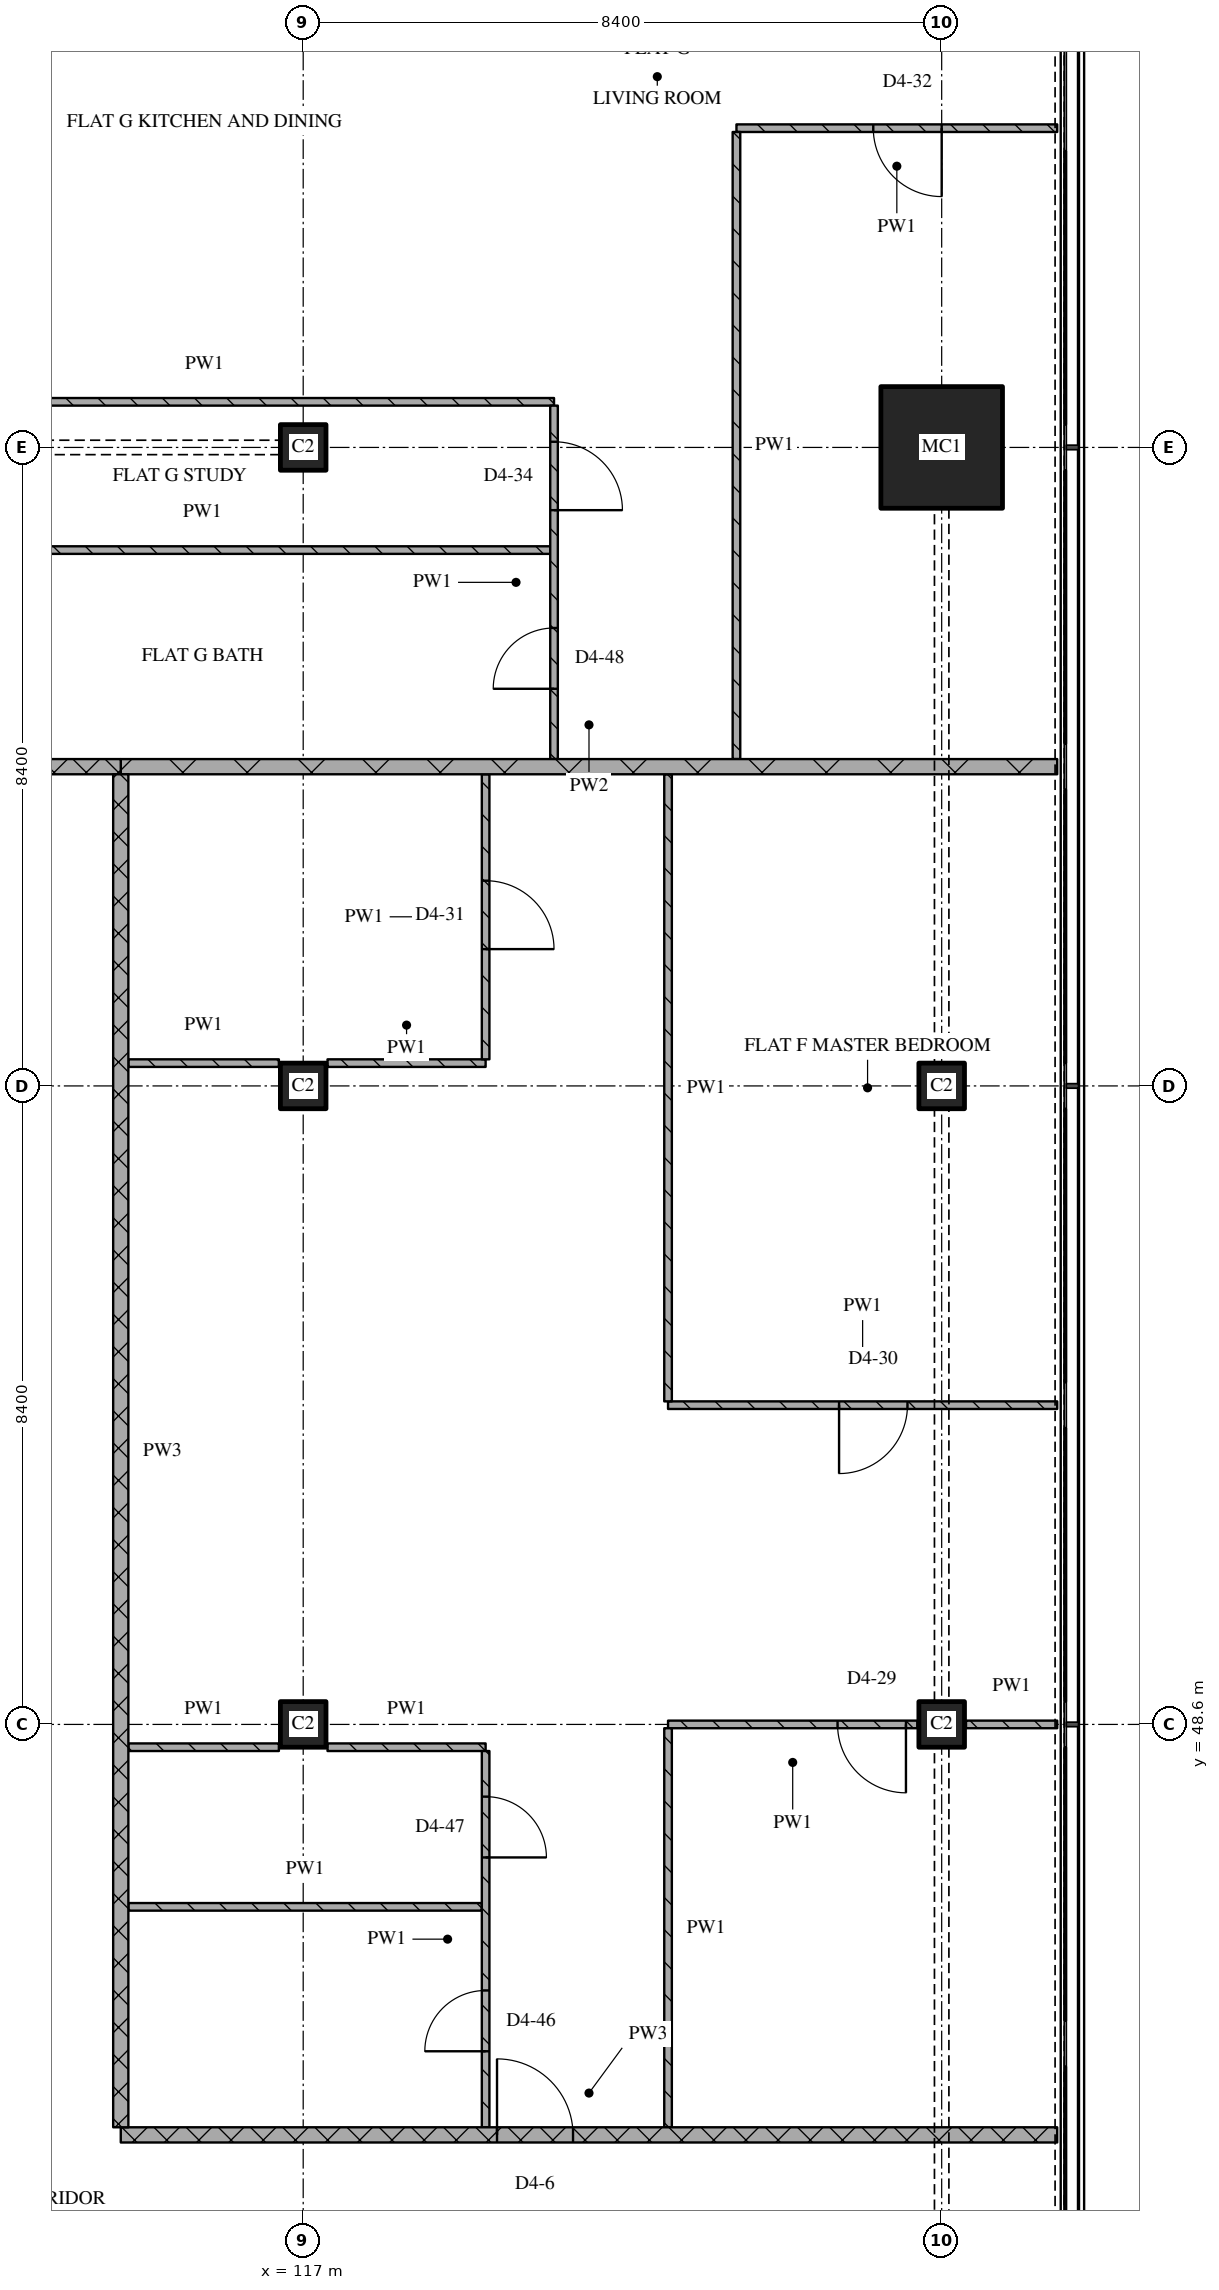
"""IFC4 building model, lengths in metres.
Left out: names, types, materials, properties, quantities, classifications, styles, units other than length and angle.
Written with IfcOpenShell. Run it as: python <this file> out.ifc"""

import sys

from ifc_helpers import new_model, si_unit, direction, frame, frame_2d, origin, origin_2d, place, context, subcontext, project, spatial, rectangle, extrude, element, fill, save


model = new_model("IFC4")
c1 = context("Model", 3, precision=1e-05, world=origin(), true_north=direction((0.0, 1.0)))
c2 = subcontext(c1, "Body", "Model", "MODEL_VIEW")
j1 = project(units=[si_unit("LENGTHUNIT", "METRE"), si_unit("PLANEANGLEUNIT", "RADIAN")], contexts=[c1])
p1 = place(None, origin())
s1 = spatial("IfcSite", under=j1, at=p1, CompositionType="ELEMENT")
p2 = place(p1, origin())
s2 = spatial("IfcBuilding", under=s1, at=p2, CompositionType="ELEMENT")
p3 = place(p2, frame((0.0, 0.0, 241.5)))
s3 = spatial("IfcBuildingStorey", under=s2, at=p3, CompositionType="ELEMENT", Elevation=241.5)
for number, where, z_axis, x_axis in (
    (1, (117.0, 48.6, 0.0), (0.0, 0.0, 1.0), (1.0, 0.0, 0.0)),
    (2, (117.0, 57.0, 0.0), (0.0, 0.0, 1.0), (1.0, 0.0, 0.0)),
    (3, (117.0, 65.4, 0.0), (0.0, 0.0, 1.0), (1.0, 0.0, 0.0)),
    (4, (125.4, 48.6, 0.0), (0.0, 0.0, 1.0), (1.0, 0.0, 0.0)),
    (5, (125.4, 57.0, 0.0), (0.0, 0.0, 1.0), (1.0, 0.0, 0.0)),
):
    element("IfcColumn", number, at=place(p3, frame(where, z_axis=z_axis, x_axis=x_axis)), inside=s3, PredefinedType="COLUMN", context=c2, shape_type="SweptSolid", body=[
        extrude(rectangle(XDim=0.6, YDim=0.6, at=origin_2d()), origin(), (0.0, 0.0, 1.0), 3.6),
    ])
p4 = place(p3, frame((125.4, 65.4, 0.0), z_axis=(0.0, 0.0, 1.0), x_axis=(1.0, 0.0, 0.0)))
e6 = element("IfcColumn", 6, at=p4, inside=s3, PredefinedType="COLUMN", context=c2, shape_type="SweptSolid", body=[
    extrude(rectangle(XDim=1.6, YDim=1.6, at=origin_2d()), origin(), (0.0, 0.0, 1.0), 3.6),
])
p5 = place(p3, frame((114.6, 43.2, 0.0), z_axis=(0.0, 0.0, 1.0), x_axis=(1.0, 0.0, 0.0)))
e7 = element("IfcWall", 7, at=p5, inside=s3, PredefinedType="PARTITIONING", context=c2, shape_type="SweptSolid", body=[
    extrude(rectangle(XDim=12.32, YDim=0.2, at=frame_2d((6.16, 0.0))), origin(), (0.0, 0.0, 1.0), 3.32),
])
p6 = place(p5, frame((4.95, 0.0, 0.0)))
e8 = element("IfcOpeningElement", 8, at=p6, cuts=e7, PredefinedType="OPENING", context=c2, shape_type="SweptSolid", body=[
    extrude(rectangle(XDim=1.0, YDim=2.1, at=frame_2d((0.5, 1.05))), frame((0.0, 0.11, 0.0), z_axis=(0.0, -1.0, 0.0), x_axis=(1.0, 0.0, 0.0)), (0.0, 0.0, 1.0), 0.22),
])
p7 = place(p3, frame((114.7, 46.2, 0.0), z_axis=(0.0, 0.0, 1.0), x_axis=(1.0, 0.0, 0.0)))
e9 = element("IfcWall", 9, at=p7, inside=s3, PredefinedType="PARTITIONING", context=c2, shape_type="SweptSolid", body=[
    extrude(rectangle(XDim=4.65, YDim=0.1, at=frame_2d((2.325, 0.0))), origin(), (0.0, 0.0, 1.0), 3.32),
])
p8 = place(p3, frame((114.7, 48.3, 0.0), z_axis=(0.0, 0.0, 1.0), x_axis=(1.0, 0.0, 0.0)))
e10 = element("IfcWall", 10, at=p8, inside=s3, PredefinedType="PARTITIONING", context=c2, shape_type="SweptSolid", body=[
    extrude(rectangle(XDim=1.98, YDim=0.1, at=frame_2d((0.99, 0.0))), origin(), (0.0, 0.0, 1.0), 3.32),
])
p9 = place(p3, frame((117.32, 48.3, 0.0), z_axis=(0.0, 0.0, 1.0), x_axis=(1.0, 0.0, 0.0)))
e11 = element("IfcWall", 11, at=p9, inside=s3, PredefinedType="PARTITIONING", context=c2, shape_type="SweptSolid", body=[
    extrude(rectangle(XDim=2.08, YDim=0.1, at=frame_2d((1.04, 0.0))), origin(), (0.0, 0.0, 1.0), 3.32),
])
p10 = place(p3, frame((125.08, 48.6, 0.0), z_axis=(0.0, 0.0, 1.0), x_axis=(-1.0, 0.0, 0.0)))
e12 = element("IfcWall", 12, at=p10, inside=s3, PredefinedType="PARTITIONING", context=c2, shape_type="SweptSolid", body=[
    extrude(rectangle(XDim=3.28, YDim=0.1, at=frame_2d((1.64, 0.0))), origin(), (0.0, 0.0, 1.0), 3.32),
])
p11 = place(p10, frame((0.15, 0.0, 0.0)))
e13 = element("IfcOpeningElement", 13, at=p11, cuts=e12, PredefinedType="OPENING", context=c2, shape_type="SweptSolid", body=[
    extrude(rectangle(XDim=0.9, YDim=2.1, at=frame_2d((0.45, 1.05))), frame((0.0, 0.06, 0.0), z_axis=(0.0, -1.0, 0.0), x_axis=(1.0, 0.0, 0.0)), (0.0, 0.0, 1.0), 0.12),
])
p12 = place(p3, frame((125.72, 48.6, 0.0), z_axis=(0.0, 0.0, 1.0), x_axis=(1.0, 0.0, 0.0)))
e14 = element("IfcWall", 14, at=p12, inside=s3, PredefinedType="PARTITIONING", context=c2, shape_type="SweptSolid", body=[
    extrude(rectangle(XDim=1.2, YDim=0.1, at=frame_2d((0.6, 0.0))), origin(), (0.0, 0.0, 1.0), 3.32),
])
p13 = place(p3, frame((121.8, 52.8, 0.0), z_axis=(0.0, 0.0, 1.0), x_axis=(1.0, 0.0, 0.0)))
e15 = element("IfcWall", 15, at=p13, inside=s3, PredefinedType="PARTITIONING", context=c2, shape_type="SweptSolid", body=[
    extrude(rectangle(XDim=5.12, YDim=0.1, at=frame_2d((2.56, 0.0))), origin(), (0.0, 0.0, 1.0), 3.32),
])
p14 = place(p13, frame((2.25, 0.0, 0.0)))
e16 = element("IfcOpeningElement", 16, at=p14, cuts=e15, PredefinedType="OPENING", context=c2, shape_type="SweptSolid", body=[
    extrude(rectangle(XDim=0.9, YDim=2.1, at=frame_2d((0.45, 1.05))), frame((0.0, 0.06, 0.0), z_axis=(0.0, -1.0, 0.0), x_axis=(1.0, 0.0, 0.0)), (0.0, 0.0, 1.0), 0.12),
])
p15 = place(p3, frame((114.7, 57.3, 0.0), z_axis=(0.0, 0.0, 1.0), x_axis=(1.0, 0.0, 0.0)))
e17 = element("IfcWall", 17, at=p15, inside=s3, PredefinedType="PARTITIONING", context=c2, shape_type="SweptSolid", body=[
    extrude(rectangle(XDim=1.98, YDim=0.1, at=frame_2d((0.99, 0.0))), origin(), (0.0, 0.0, 1.0), 3.32),
])
p16 = place(p3, frame((117.32, 57.3, 0.0), z_axis=(0.0, 0.0, 1.0), x_axis=(1.0, 0.0, 0.0)))
e18 = element("IfcWall", 18, at=p16, inside=s3, PredefinedType="PARTITIONING", context=c2, shape_type="SweptSolid", body=[
    extrude(rectangle(XDim=2.08, YDim=0.1, at=frame_2d((1.04, 0.0))), origin(), (0.0, 0.0, 1.0), 3.32),
])
p17 = place(p3, frame((111.0, 61.2, 0.0), z_axis=(0.0, 0.0, 1.0), x_axis=(1.0, 0.0, 0.0)))
e19 = element("IfcWall", 19, at=p17, inside=s3, PredefinedType="PARTITIONING", context=c2, shape_type="SweptSolid", body=[
    extrude(rectangle(XDim=3.6, YDim=0.2, at=frame_2d((1.8, 0.0))), origin(), (0.0, 0.0, 1.0), 3.32),
])
p18 = place(p3, frame((114.6, 61.2, 0.0), z_axis=(0.0, 0.0, 1.0), x_axis=(1.0, 0.0, 0.0)))
e20 = element("IfcWall", 20, at=p18, inside=s3, PredefinedType="PARTITIONING", context=c2, shape_type="SweptSolid", body=[
    extrude(rectangle(XDim=12.32, YDim=0.2, at=frame_2d((6.16, 0.0))), origin(), (0.0, 0.0, 1.0), 3.32),
])
p19 = place(p3, frame((111.1, 64.05, 0.0), z_axis=(0.0, 0.0, 1.0), x_axis=(1.0, 0.0, 0.0)))
e21 = element("IfcWall", 21, at=p19, inside=s3, PredefinedType="PARTITIONING", context=c2, shape_type="SweptSolid", body=[
    extrude(rectangle(XDim=9.15, YDim=0.1, at=frame_2d((4.575, 0.0))), origin(), (0.0, 0.0, 1.0), 3.32),
])
p20 = place(p3, frame((111.1, 66.0, 0.0), z_axis=(0.0, 0.0, 1.0), x_axis=(1.0, 0.0, 0.0)))
e22 = element("IfcWall", 22, at=p20, inside=s3, PredefinedType="PARTITIONING", context=c2, shape_type="SweptSolid", body=[
    extrude(rectangle(XDim=9.2, YDim=0.1, at=frame_2d((4.6, 0.0))), origin(), (0.0, 0.0, 1.0), 3.32),
])
p21 = place(p3, frame((126.92, 69.6, 0.0), z_axis=(0.0, 0.0, 1.0), x_axis=(-1.0, 0.0, 0.0)))
e23 = element("IfcWall", 23, at=p21, inside=s3, PredefinedType="PARTITIONING", context=c2, shape_type="SweptSolid", body=[
    extrude(rectangle(XDim=4.22, YDim=0.1, at=frame_2d((2.11, 0.0))), origin(), (0.0, 0.0, 1.0), 3.32),
])
p22 = place(p21, frame((1.52, 0.0, 0.0)))
e24 = element("IfcOpeningElement", 24, at=p22, cuts=e23, PredefinedType="OPENING", context=c2, shape_type="SweptSolid", body=[
    extrude(rectangle(XDim=0.9, YDim=2.1, at=frame_2d((0.45, 1.05))), frame((0.0, 0.06, 0.0), z_axis=(0.0, -1.0, 0.0), x_axis=(1.0, 0.0, 0.0)), (0.0, 0.0, 1.0), 0.12),
])
p23 = place(p3, frame((114.6, 61.1, 0.0), z_axis=(0.0, 0.0, 1.0), x_axis=(0.0, -1.0, 0.0)))
e25 = element("IfcWall", 25, at=p23, inside=s3, PredefinedType="PARTITIONING", context=c2, shape_type="SweptSolid", body=[
    extrude(rectangle(XDim=17.8, YDim=0.2, at=frame_2d((8.9, 0.0))), origin(), (0.0, 0.0, 1.0), 3.32),
])
p24 = place(p3, frame((119.4, 43.3, 0.0), z_axis=(0.0, 0.0, 1.0), x_axis=(0.0, 1.0, 0.0)))
e26 = element("IfcWall", 26, at=p24, inside=s3, PredefinedType="PARTITIONING", context=c2, shape_type="SweptSolid", body=[
    extrude(rectangle(XDim=4.95, YDim=0.1, at=frame_2d((2.475, 0.0))), origin(), (0.0, 0.0, 1.0), 3.32),
])
p25 = place(p24, frame((1.0, 0.0, 0.0)))
e27 = element("IfcOpeningElement", 27, at=p25, cuts=e26, PredefinedType="OPENING", context=c2, shape_type="SweptSolid", body=[
    extrude(rectangle(XDim=0.8, YDim=2.1, at=frame_2d((0.4, 1.05))), frame((0.0, 0.06, 0.0), z_axis=(0.0, -1.0, 0.0), x_axis=(1.0, 0.0, 0.0)), (0.0, 0.0, 1.0), 0.12),
])
p26 = place(p24, frame((3.55, 0.0, 0.0)))
e28 = element("IfcOpeningElement", 28, at=p26, cuts=e26, PredefinedType="OPENING", context=c2, shape_type="SweptSolid", body=[
    extrude(rectangle(XDim=0.8, YDim=2.1, at=frame_2d((0.4, 1.05))), frame((0.0, 0.06, 0.0), z_axis=(0.0, -1.0, 0.0), x_axis=(1.0, 0.0, 0.0)), (0.0, 0.0, 1.0), 0.12),
])
p27 = place(p3, frame((119.4, 57.35, 0.0), z_axis=(0.0, 0.0, 1.0), x_axis=(0.0, 1.0, 0.0)))
e29 = element("IfcWall", 29, at=p27, inside=s3, PredefinedType="PARTITIONING", context=c2, shape_type="SweptSolid", body=[
    extrude(rectangle(XDim=3.75, YDim=0.1, at=frame_2d((1.875, 0.0))), origin(), (0.0, 0.0, 1.0), 3.32),
])
p28 = place(p27, frame((1.45, 0.0, 0.0)))
e30 = element("IfcOpeningElement", 30, at=p28, cuts=e29, PredefinedType="OPENING", context=c2, shape_type="SweptSolid", body=[
    extrude(rectangle(XDim=0.9, YDim=2.1, at=frame_2d((0.45, 1.05))), frame((0.0, 0.06, 0.0), z_axis=(0.0, -1.0, 0.0), x_axis=(1.0, 0.0, 0.0)), (0.0, 0.0, 1.0), 0.12),
])
p29 = place(p3, frame((120.3, 61.3, 0.0), z_axis=(0.0, 0.0, 1.0), x_axis=(0.0, 1.0, 0.0)))
e31 = element("IfcWall", 31, at=p29, inside=s3, PredefinedType="PARTITIONING", context=c2, shape_type="SweptSolid", body=[
    extrude(rectangle(XDim=4.65, YDim=0.1, at=frame_2d((2.325, 0.0))), origin(), (0.0, 0.0, 1.0), 3.32),
])
p30 = place(p29, frame((0.925, 0.0, 0.0)))
e32 = element("IfcOpeningElement", 32, at=p30, cuts=e31, PredefinedType="OPENING", context=c2, shape_type="SweptSolid", body=[
    extrude(rectangle(XDim=0.8, YDim=2.1, at=frame_2d((0.4, 1.05))), frame((0.0, 0.06, 0.0), z_axis=(0.0, -1.0, 0.0), x_axis=(1.0, 0.0, 0.0)), (0.0, 0.0, 1.0), 0.12),
])
p31 = place(p29, frame((3.275, 0.0, 0.0)))
e33 = element("IfcOpeningElement", 33, at=p31, cuts=e31, PredefinedType="OPENING", context=c2, shape_type="SweptSolid", body=[
    extrude(rectangle(XDim=0.9, YDim=2.1, at=frame_2d((0.45, 1.05))), frame((0.0, 0.06, 0.0), z_axis=(0.0, -1.0, 0.0), x_axis=(1.0, 0.0, 0.0)), (0.0, 0.0, 1.0), 0.12),
])
p32 = place(p3, frame((121.8, 48.55, 0.0), z_axis=(0.0, 0.0, 1.0), x_axis=(0.0, -1.0, 0.0)))
e34 = element("IfcWall", 34, at=p32, inside=s3, PredefinedType="PARTITIONING", context=c2, shape_type="SweptSolid", body=[
    extrude(rectangle(XDim=5.25, YDim=0.1, at=frame_2d((2.625, 0.0))), origin(), (0.0, 0.0, 1.0), 3.32),
])
for number, where, z_axis, x_axis in (
    (35, (121.8, 61.1, 0.0), (0.0, 0.0, 1.0), (0.0, -1.0, 0.0)),
    (36, (122.7, 69.55, 0.0), (0.0, 0.0, 1.0), (0.0, -1.0, 0.0)),
):
    element("IfcWall", number, at=place(p3, frame(where, z_axis=z_axis, x_axis=x_axis)), inside=s3, PredefinedType="PARTITIONING", context=c2, shape_type="SweptSolid", body=[
        extrude(rectangle(XDim=8.25, YDim=0.1, at=frame_2d((4.125, 0.0))), origin(), (0.0, 0.0, 1.0), 3.32),
    ])
p33 = place(p6, origin())
e37 = element("IfcDoor", 37, at=p33, inside=s3, OperationType="SINGLE_SWING_LEFT", PredefinedType="DOOR", context=c2, shape_type="SweptSolid", body=[
    extrude(rectangle(XDim=1.0, YDim=2.1, at=frame_2d((0.5, 1.05))), frame((0.0, 0.025, 0.0), z_axis=(0.0, -1.0, 0.0), x_axis=(1.0, 0.0, 0.0)), (0.0, 0.0, 1.0), 0.05),
])
fill(e8, e37)
p34 = place(p11, origin())
e38 = element("IfcDoor", 38, at=p34, inside=s3, OperationType="SINGLE_SWING_LEFT", PredefinedType="DOOR", context=c2, shape_type="SweptSolid", body=[
    extrude(rectangle(XDim=0.9, YDim=2.1, at=frame_2d((0.45, 1.05))), frame((0.0, 0.025, 0.0), z_axis=(0.0, -1.0, 0.0), x_axis=(1.0, 0.0, 0.0)), (0.0, 0.0, 1.0), 0.05),
])
fill(e13, e38)
p35 = place(p14, origin())
e39 = element("IfcDoor", 39, at=p35, inside=s3, OperationType="SINGLE_SWING_RIGHT", PredefinedType="DOOR", context=c2, shape_type="SweptSolid", body=[
    extrude(rectangle(XDim=0.9, YDim=2.1, at=frame_2d((0.45, 1.05))), frame((0.0, 0.025, 0.0), z_axis=(0.0, -1.0, 0.0), x_axis=(1.0, 0.0, 0.0)), (0.0, 0.0, 1.0), 0.05),
])
fill(e16, e39)
p36 = place(p22, origin())
e40 = element("IfcDoor", 40, at=p36, inside=s3, OperationType="SINGLE_SWING_LEFT", PredefinedType="DOOR", context=c2, shape_type="SweptSolid", body=[
    extrude(rectangle(XDim=0.9, YDim=2.1, at=frame_2d((0.45, 1.05))), frame((0.0, 0.025, 0.0), z_axis=(0.0, -1.0, 0.0), x_axis=(1.0, 0.0, 0.0)), (0.0, 0.0, 1.0), 0.05),
])
fill(e24, e40)
p37 = place(p25, origin())
e41 = element("IfcDoor", 41, at=p37, inside=s3, OperationType="SINGLE_SWING_LEFT", PredefinedType="DOOR", context=c2, shape_type="SweptSolid", body=[
    extrude(rectangle(XDim=0.8, YDim=2.1, at=frame_2d((0.4, 1.05))), frame((0.0, 0.025, 0.0), z_axis=(0.0, -1.0, 0.0), x_axis=(1.0, 0.0, 0.0)), (0.0, 0.0, 1.0), 0.05),
])
fill(e27, e41)
p38 = place(p26, origin())
e42 = element("IfcDoor", 42, at=p38, inside=s3, OperationType="SINGLE_SWING_RIGHT", PredefinedType="DOOR", context=c2, shape_type="SweptSolid", body=[
    extrude(rectangle(XDim=0.8, YDim=2.1, at=frame_2d((0.4, 1.05))), frame((0.0, 0.025, 0.0), z_axis=(0.0, -1.0, 0.0), x_axis=(1.0, 0.0, 0.0)), (0.0, 0.0, 1.0), 0.05),
])
fill(e28, e42)
p39 = place(p28, origin())
e43 = element("IfcDoor", 43, at=p39, inside=s3, OperationType="SINGLE_SWING_RIGHT", PredefinedType="DOOR", context=c2, shape_type="SweptSolid", body=[
    extrude(rectangle(XDim=0.9, YDim=2.1, at=frame_2d((0.45, 1.05))), frame((0.0, 0.025, 0.0), z_axis=(0.0, -1.0, 0.0), x_axis=(1.0, 0.0, 0.0)), (0.0, 0.0, 1.0), 0.05),
])
fill(e30, e43)
p40 = place(p30, origin())
e44 = element("IfcDoor", 44, at=p40, inside=s3, OperationType="SINGLE_SWING_LEFT", PredefinedType="DOOR", context=c2, shape_type="SweptSolid", body=[
    extrude(rectangle(XDim=0.8, YDim=2.1, at=frame_2d((0.4, 1.05))), frame((0.0, 0.025, 0.0), z_axis=(0.0, -1.0, 0.0), x_axis=(1.0, 0.0, 0.0)), (0.0, 0.0, 1.0), 0.05),
])
fill(e32, e44)
p41 = place(p31, origin())
e45 = element("IfcDoor", 45, at=p41, inside=s3, OperationType="SINGLE_SWING_RIGHT", PredefinedType="DOOR", context=c2, shape_type="SweptSolid", body=[
    extrude(rectangle(XDim=0.9, YDim=2.1, at=frame_2d((0.45, 1.05))), frame((0.0, 0.025, 0.0), z_axis=(0.0, -1.0, 0.0), x_axis=(1.0, 0.0, 0.0)), (0.0, 0.0, 1.0), 0.05),
])
fill(e33, e45)
save(model, sys.argv[1])
